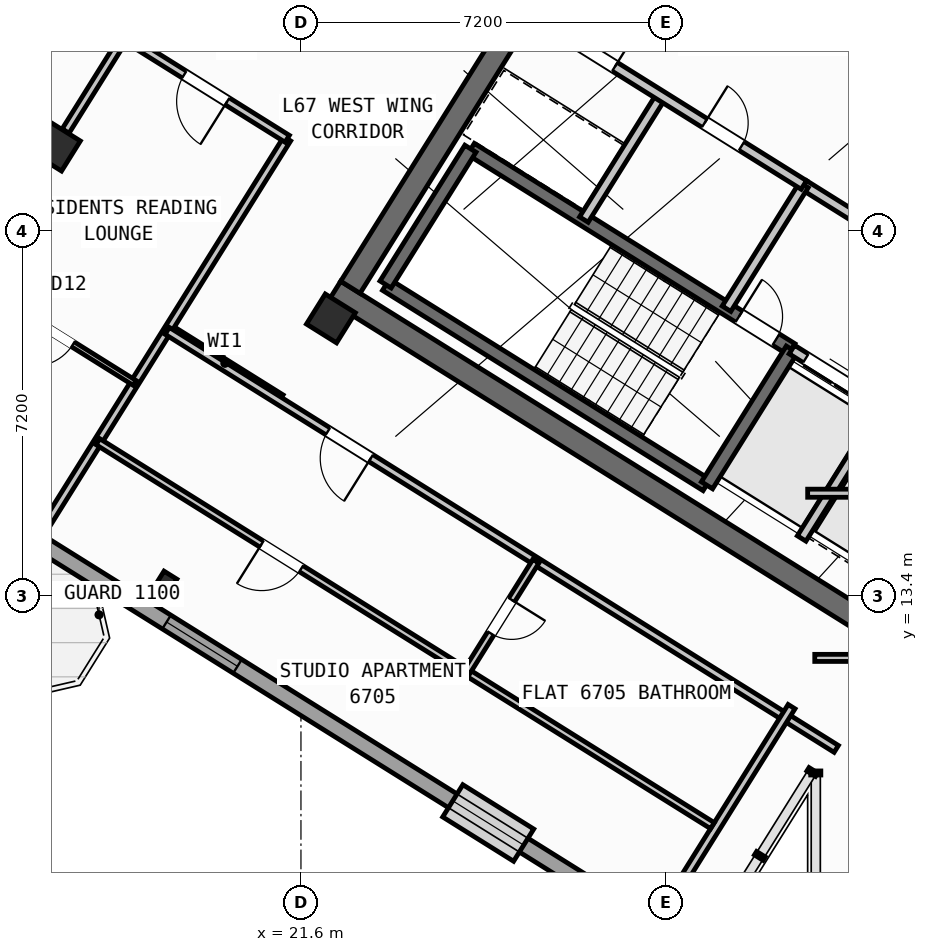
"""IFC4 building model, lengths in metres.
Left out: names, types, materials, properties, quantities, classifications, styles, units other than length and angle.
Written with IfcOpenShell. Run it as: python <this file> out.ifc"""

import sys

from ifc_helpers import new_model, si_unit, direction, frame, frame_2d, origin, origin_2d, place, context, subcontext, project, spatial, rectangle, hollow_rectangle, i_section, extrude, source, transform, mapped, element, fill, save


model = new_model("IFC4")
c1 = context("Model", 3, precision=1e-05, world=origin(), true_north=direction((0.0, 1.0)))
c2 = subcontext(c1, "Body", "Model", "MODEL_VIEW")
j1 = project(units=[si_unit("LENGTHUNIT", "METRE"), si_unit("PLANEANGLEUNIT", "RADIAN")], contexts=[c1])
p1 = place(None, origin())
s1 = spatial("IfcSite", under=j1, at=p1, CompositionType="ELEMENT")
p2 = place(p1, origin())
s2 = spatial("IfcBuilding", under=s1, at=p2, CompositionType="ELEMENT")
p3 = place(p2, frame((0.0, 0.0, 266.4)))
s3 = spatial("IfcBuildingStorey", under=s2, at=p3, CompositionType="ELEMENT", Elevation=266.4)
p4 = place(p3, frame((40.531, 24.036, 0.0), z_axis=(0.0, 0.0, 1.0), x_axis=(-0.848048787466, 0.529918157905, 0.0)))
e1 = element("IfcWall", 1, at=p4, inside=s3, PredefinedType="SHEAR", context=c2, shape_type="SweptSolid", body=[
    extrude(rectangle(XDim=13.04, YDim=0.45, at=frame_2d((6.52, 0.0))), origin(), (0.0, 0.0, 1.0), 3.35),
])
p5 = place(p3, frame((33.324, 12.503, 0.0), z_axis=(0.0, 0.0, 1.0), x_axis=(-0.848043529849, 0.529926571782, 0.0)))
e2 = element("IfcWall", 2, at=p5, inside=s3, PredefinedType="SHEAR", context=c2, shape_type="SweptSolid", body=[
    extrude(rectangle(XDim=13.04, YDim=0.45, at=frame_2d((6.52, 0.0))), origin(), (0.0, 0.0, 1.0), 3.35),
])
p6 = place(p3, frame((26.007, 24.976, 0.0), z_axis=(0.0, 0.0, 1.0), x_axis=(-0.529931155655, -0.848040665456, 0.0)))
e3 = element("IfcWall", 3, at=p6, inside=s3, PredefinedType="SHEAR", context=c2, shape_type="SweptSolid", body=[
    extrude(rectangle(XDim=6.475, YDim=0.45, at=frame_2d((3.238, 0.0))), origin(), (0.0, 0.0, 1.0), 3.35),
])
m1 = source(origin(), c2, "Body", "SweptSolid", [
    extrude(hollow_rectangle(XDim=0.7, YDim=0.7, WallThickness=0.028, at=origin_2d()), origin(), (0.0, 0.0, 1.0), 3.6),
])
p7 = place(p3, frame((22.191, 18.87, 0.0), z_axis=(0.0, 0.0, 1.0), x_axis=(-0.848048096156, 0.529919264233, 0.0)))
e4 = element("IfcColumn", 4, at=p7, inside=s3, PredefinedType="COLUMN", context=c2, shape_type="MappedRepresentation", body=[
    mapped(m1, transform((0.0, 0.0, 0.0), scale=1.0)),
])
m2 = source(origin(), c2, "Body", "SweptSolid", [
    extrude(i_section(OverallWidth=0.3, OverallDepth=0.45, WebThickness=0.014, FlangeThickness=0.026, at=origin_2d()), origin(), (0.0, 0.0, 1.0), 3.6),
])
p8 = place(p3, frame((18.906, 13.612, 0.0), z_axis=(0.0, 0.0, 1.0), x_axis=(-0.848048096156, 0.529919264233, 0.0)))
e5 = element("IfcColumn", 5, at=p8, inside=s3, PredefinedType="COLUMN", context=c2, shape_type="MappedRepresentation", body=[
    mapped(m2, transform((0.0, 0.0, 0.0), scale=1.0)),
])
p9 = place(p3, frame((16.764, 22.261, 0.0), z_axis=(0.0, 0.0, 1.0), x_axis=(-0.848048096156, 0.529919264233, 0.0)))
e6 = element("IfcColumn", 6, at=p9, inside=s3, PredefinedType="COLUMN", context=c2, shape_type="MappedRepresentation", body=[
    mapped(m1, transform((0.0, 0.0, 0.0), scale=1.0)),
])
p10 = place(p3, frame((29.268, 6.429, 0.0), z_axis=(0.0, 0.0, 1.0), x_axis=(-0.848049971435, 0.529916263149, 0.0)))
e7 = element("IfcWall", 7, at=p10, inside=s3, PredefinedType="STANDARD", context=c2, shape_type="SweptSolid", body=[
    extrude(rectangle(XDim=31.588, YDim=0.32, at=frame_2d((15.794, 0.0))), origin(), (0.0, 0.0, 1.0), 3.35),
])
p11 = place(p10, frame((16.362, 0.0, 0.0)))
e8 = element("IfcOpeningElement", 8, at=p11, cuts=e7, PredefinedType="OPENING", context=c2, shape_type="SweptSolid", body=[
    extrude(rectangle(XDim=1.2, YDim=2.15, at=frame_2d((0.6, 1.075))), frame((0.0, 0.17, 0.0), z_axis=(0.0, -1.0, 0.0), x_axis=(1.0, 0.0, 0.0)), (0.0, 0.0, 1.0), 0.34),
])
p12 = place(p10, frame((3.859, 0.0, 0.9)))
e9 = element("IfcOpeningElement", 9, at=p12, cuts=e7, PredefinedType="OPENING", context=c2, shape_type="SweptSolid", body=[
    extrude(rectangle(XDim=1.65, YDim=1.45, at=frame_2d((0.825, 0.725))), frame((0.0, 0.17, 0.0), z_axis=(0.0, -1.0, 0.0), x_axis=(1.0, 0.0, 0.0)), (0.0, 0.0, 1.0), 0.34),
])
p13 = place(p10, frame((10.519, 0.0, 0.9)))
e10 = element("IfcOpeningElement", 10, at=p13, cuts=e7, PredefinedType="OPENING", context=c2, shape_type="SweptSolid", body=[
    extrude(rectangle(XDim=1.65, YDim=1.45, at=frame_2d((0.825, 0.725))), frame((0.0, 0.17, 0.0), z_axis=(0.0, -1.0, 0.0), x_axis=(1.0, 0.0, 0.0)), (0.0, 0.0, 1.0), 0.34),
])
p14 = place(p10, frame((21.219, 0.0, 0.95)))
e11 = element("IfcOpeningElement", 11, at=p14, cuts=e7, PredefinedType="OPENING", context=c2, shape_type="SweptSolid", body=[
    extrude(rectangle(XDim=1.95, YDim=1.35, at=frame_2d((0.975, 0.675))), frame((0.0, 0.17, 0.0), z_axis=(0.0, -1.0, 0.0), x_axis=(1.0, 0.0, 0.0)), (0.0, 0.0, 1.0), 0.34),
])
p15 = place(p10, frame((26.406, 0.0, 1.0)))
e12 = element("IfcOpeningElement", 12, at=p15, cuts=e7, PredefinedType="OPENING", context=c2, shape_type="SweptSolid", body=[
    extrude(rectangle(XDim=0.9, YDim=1.25, at=frame_2d((0.45, 0.625))), frame((0.0, 0.17, 0.0), z_axis=(0.0, -1.0, 0.0), x_axis=(1.0, 0.0, 0.0)), (0.0, 0.0, 1.0), 0.34),
])
p16 = place(p10, frame((29.143, 0.0, 0.9)))
e13 = element("IfcOpeningElement", 13, at=p16, cuts=e7, PredefinedType="OPENING", context=c2, shape_type="SweptSolid", body=[
    extrude(rectangle(XDim=1.65, YDim=1.45, at=frame_2d((0.825, 0.725))), frame((0.0, 0.17, 0.0), z_axis=(0.0, -1.0, 0.0), x_axis=(1.0, 0.0, 0.0)), (0.0, 0.0, 1.0), 0.34),
])
p17 = place(p3, frame((29.605, 15.581, 0.0), z_axis=(0.0, 0.0, 1.0), x_axis=(-0.848036911448, 0.529937163087, 0.0)))
e14 = element("IfcWall", 14, at=p17, inside=s3, PredefinedType="SHEAR", context=c2, shape_type="SweptSolid", body=[
    extrude(rectangle(XDim=7.46, YDim=0.26, at=frame_2d((3.73, 0.0))), origin(), (0.0, 0.0, 1.0), 3.35),
])
p18 = place(p3, frame((31.28, 18.261, 0.0), z_axis=(0.0, 0.0, 1.0), x_axis=(-0.848051618787, 0.529913626805, 0.0)))
e15 = element("IfcWall", 15, at=p18, inside=s3, PredefinedType="SHEAR", context=c2, shape_type="SweptSolid", body=[
    extrude(rectangle(XDim=7.46, YDim=0.26, at=frame_2d((3.73, 0.0))), origin(), (0.0, 0.0, 1.0), 3.35),
])
p19 = place(p18, frame((0.36, 0.0, 0.0)))
e16 = element("IfcOpeningElement", 16, at=p19, cuts=e15, PredefinedType="OPENING", context=c2, shape_type="SweptSolid", body=[
    extrude(rectangle(XDim=0.86, YDim=2.05, at=frame_2d((0.43, 1.025))), frame((0.0, 0.14, 0.0), z_axis=(0.0, -1.0, 0.0), x_axis=(1.0, 0.0, 0.0)), (0.0, 0.0, 1.0), 0.28),
])
p20 = place(p3, frame((31.288, 18.256, 0.0), z_axis=(0.0, 0.0, 1.0), x_axis=(-0.529943379326, -0.848033026897, 0.0)))
e17 = element("IfcWall", 17, at=p20, inside=s3, PredefinedType="SHEAR", context=c2, shape_type="SweptSolid", body=[
    extrude(rectangle(XDim=3.16, YDim=0.26, at=frame_2d((1.58, 0.0))), origin(), (0.0, 0.0, 1.0), 3.35),
])
p21 = place(p3, frame((24.945, 22.22, 0.0), z_axis=(0.0, 0.0, 1.0), x_axis=(-0.529908658664, -0.84805472316, 0.0)))
e18 = element("IfcWall", 18, at=p21, inside=s3, PredefinedType="SHEAR", context=c2, shape_type="SweptSolid", body=[
    extrude(rectangle(XDim=3.16, YDim=0.26, at=frame_2d((1.58, 0.0))), origin(), (0.0, 0.0, 1.0), 3.35),
])
p22 = place(p3, frame((38.046, 21.108, 0.0), z_axis=(0.0, 0.0, 1.0), x_axis=(-0.848054434086, 0.529909121291, 0.0)))
e19 = element("IfcWall", 19, at=p22, inside=s3, PredefinedType="SHEAR", context=c2, shape_type="SweptSolid", body=[
    extrude(rectangle(XDim=7.33, YDim=0.26, at=frame_2d((3.665, 0.0))), origin(), (0.0, 0.0, 1.0), 3.35),
])
p23 = place(p22, frame((0.22, 0.0, 0.0)))
e20 = element("IfcOpeningElement", 20, at=p23, cuts=e19, PredefinedType="OPENING", context=c2, shape_type="SweptSolid", body=[
    extrude(rectangle(XDim=1.1, YDim=2.1, at=frame_2d((0.55, 1.05))), frame((0.0, 0.14, 0.0), z_axis=(0.0, -1.0, 0.0), x_axis=(1.0, 0.0, 0.0)), (0.0, 0.0, 1.0), 0.28),
])
p24 = place(p3, frame((34.933, 15.978, 0.0), z_axis=(0.0, 0.0, 1.0), x_axis=(-0.848055739377, 0.529907032327, 0.0)))
e21 = element("IfcWall", 21, at=p24, inside=s3, PredefinedType="STANDARD", context=c2, shape_type="SweptSolid", body=[
    extrude(rectangle(XDim=4.298, YDim=0.2, at=frame_2d((2.149, 0.0))), origin(), (0.0, 0.0, 1.0), 3.34),
])
p25 = place(p24, frame((0.448, 0.0, 0.0)))
e22 = element("IfcOpeningElement", 22, at=p25, cuts=e21, PredefinedType="OPENING", context=c2, shape_type="SweptSolid", body=[
    extrude(rectangle(XDim=1.3, YDim=2.2, at=frame_2d((0.65, 1.1))), frame((0.0, 0.11, 0.0), z_axis=(0.0, -1.0, 0.0), x_axis=(1.0, 0.0, 0.0)), (0.0, 0.0, 1.0), 0.22),
])
p26 = place(p24, frame((2.523, 0.0, 0.0)))
e23 = element("IfcOpeningElement", 23, at=p26, cuts=e21, PredefinedType="OPENING", context=c2, shape_type="SweptSolid", body=[
    extrude(rectangle(XDim=1.45, YDim=2.25, at=frame_2d((0.725, 1.125))), frame((0.0, 0.11, 0.0), z_axis=(0.0, -1.0, 0.0), x_axis=(1.0, 0.0, 0.0)), (0.0, 0.0, 1.0), 0.22),
])
p27 = place(p3, frame((36.459, 18.421, 0.0), z_axis=(0.0, 0.0, 1.0), x_axis=(-0.848059591691, 0.529900867089, 0.0)))
e24 = element("IfcWall", 24, at=p27, inside=s3, PredefinedType="STANDARD", context=c2, shape_type="SweptSolid", body=[
    extrude(rectangle(XDim=5.818, YDim=0.2, at=frame_2d((2.909, 0.0))), origin(), (0.0, 0.0, 1.0), 3.34),
])
p28 = place(p27, frame((2.598, 0.0, 0.0)))
e25 = element("IfcOpeningElement", 25, at=p28, cuts=e24, PredefinedType="OPENING", context=c2, shape_type="SweptSolid", body=[
    extrude(rectangle(XDim=1.15, YDim=2.1, at=frame_2d((0.575, 1.05))), frame((0.0, 0.11, 0.0), z_axis=(0.0, -1.0, 0.0), x_axis=(1.0, 0.0, 0.0)), (0.0, 0.0, 1.0), 0.22),
])
p29 = place(p3, frame((33.029, 17.003, 0.0), z_axis=(0.0, 0.0, 1.0), x_axis=(-0.529916267533, -0.848049968695, 0.0)))
e26 = element("IfcWall", 26, at=p29, inside=s3, PredefinedType="STANDARD", context=c2, shape_type="SweptSolid", body=[
    extrude(rectangle(XDim=2.92, YDim=0.2, at=frame_2d((1.46, 0.0))), origin(), (0.0, 0.0, 1.0), 3.34),
])
for number, where, z_axis, x_axis in (
    (27, (31.525, 21.504, 0.0), (0.0, 0.0, 1.0), (-0.53, -0.848, 0.0)),
    (28, (28.71, 23.263, 0.0), (0.0, 0.0, 1.0), (-0.53, -0.848, 0.0)),
):
    element("IfcWall", number, at=place(p3, frame(where, z_axis=z_axis, x_axis=x_axis)), inside=s3, PredefinedType="STANDARD", context=c2, shape_type="SweptSolid", body=[
        extrude(rectangle(XDim=2.88, YDim=0.2, at=frame_2d((1.44, 0.0))), origin(), (0.0, 0.0, 1.0), 3.34),
    ])
p30 = place(p3, frame((31.525, 21.504, 0.0), z_axis=(0.0, 0.0, 1.0), x_axis=(-0.848042066329, 0.529928913853, 0.0)))
e29 = element("IfcWall", 29, at=p30, inside=s3, PredefinedType="STANDARD", context=c2, shape_type="SweptSolid", body=[
    extrude(rectangle(XDim=6.268, YDim=0.2, at=frame_2d((3.134, 0.0))), origin(), (0.0, 0.0, 1.0), 3.34),
])
p31 = place(p30, frame((4.4, 0.0, 0.0)))
e30 = element("IfcOpeningElement", 30, at=p31, cuts=e29, PredefinedType="OPENING", context=c2, shape_type="SweptSolid", body=[
    extrude(rectangle(XDim=0.86, YDim=2.05, at=frame_2d((0.43, 1.025))), frame((0.0, 0.11, 0.0), z_axis=(0.0, -1.0, 0.0), x_axis=(1.0, 0.0, 0.0)), (0.0, 0.0, 1.0), 0.22),
])
p32 = place(p30, frame((1.45, 0.0, 0.0)))
e31 = element("IfcOpeningElement", 31, at=p32, cuts=e29, PredefinedType="OPENING", context=c2, shape_type="SweptSolid", body=[
    extrude(rectangle(XDim=0.86, YDim=2.05, at=frame_2d((0.43, 1.025))), frame((0.0, 0.11, 0.0), z_axis=(0.0, -1.0, 0.0), x_axis=(1.0, 0.0, 0.0)), (0.0, 0.0, 1.0), 0.22),
])
p33 = place(p3, frame((21.206, 17.292, 0.0), z_axis=(0.0, 0.0, 1.0), x_axis=(-0.848050851465, 0.529914854792, 0.0)))
e32 = element("IfcWall", 32, at=p33, inside=s3, PredefinedType="PARTITIONING", context=c2, shape_type="SweptSolid", body=[
    extrude(rectangle(XDim=2.61, YDim=0.16, at=frame_2d((1.305, 0.0))), origin(), (0.0, 0.0, 1.0), 3.34),
])
p34 = place(p3, frame((21.329, 22.416, 0.0), z_axis=(0.0, 0.0, 1.0), x_axis=(-0.529920220799, -0.848047498427, 0.0)))
e33 = element("IfcWall", 33, at=p34, inside=s3, PredefinedType="PARTITIONING", context=c2, shape_type="SweptSolid", body=[
    extrude(rectangle(XDim=9.2, YDim=0.16, at=frame_2d((4.6, 0.0))), origin(), (0.0, 0.0, 1.0), 3.34),
])
p35 = place(p3, frame((21.329, 22.416, 0.0), z_axis=(0.0, 0.0, 1.0), x_axis=(-0.848052408131, 0.529912363569, 0.0)))
e34 = element("IfcWall", 34, at=p35, inside=s3, PredefinedType="PARTITIONING", context=c2, shape_type="SweptSolid", body=[
    extrude(rectangle(XDim=16.73, YDim=0.16, at=frame_2d((8.365, 0.0))), origin(), (0.0, 0.0, 1.0), 3.34),
])
p36 = place(p35, frame((1.395, 0.0, 0.0)))
e35 = element("IfcOpeningElement", 35, at=p36, cuts=e34, PredefinedType="OPENING", context=c2, shape_type="SweptSolid", body=[
    extrude(rectangle(XDim=1.0, YDim=2.1, at=frame_2d((0.5, 1.05))), frame((0.0, 0.09, 0.0), z_axis=(0.0, -1.0, 0.0), x_axis=(1.0, 0.0, 0.0)), (0.0, 0.0, 1.0), 0.18),
])
p37 = place(p35, frame((7.82, 0.0, 0.0)))
e36 = element("IfcOpeningElement", 36, at=p37, cuts=e34, PredefinedType="OPENING", context=c2, shape_type="SweptSolid", body=[
    extrude(rectangle(XDim=1.0, YDim=2.1, at=frame_2d((0.5, 1.05))), frame((0.0, 0.09, 0.0), z_axis=(0.0, -1.0, 0.0), x_axis=(1.0, 0.0, 0.0)), (0.0, 0.0, 1.0), 0.18),
])
p38 = place(p35, frame((11.14, 0.0, 0.0)))
e37 = element("IfcOpeningElement", 37, at=p38, cuts=e34, PredefinedType="OPENING", context=c2, shape_type="SweptSolid", body=[
    extrude(rectangle(XDim=1.0, YDim=2.1, at=frame_2d((0.5, 1.05))), frame((0.0, 0.09, 0.0), z_axis=(0.0, -1.0, 0.0), x_axis=(1.0, 0.0, 0.0)), (0.0, 0.0, 1.0), 0.18),
])
p39 = place(p3, frame((18.115, 24.424, 0.0), z_axis=(0.0, 0.0, 1.0), x_axis=(-0.529998940003, -0.847998304005, 0.0)))
e38 = element("IfcWall", 38, at=p39, inside=s3, PredefinedType="PARTITIONING", context=c2, shape_type="SweptSolid", body=[
    extrude(rectangle(XDim=2.188, YDim=0.16, at=frame_2d((1.094, 0.0))), origin(), (0.0, 0.0, 1.0), 2.875),
])
p40 = place(p3, frame((18.318, 17.597, 0.0), z_axis=(0.0, 0.0, 1.0), x_axis=(-0.848059820872, 0.529900500304, 0.0)))
e39 = element("IfcWall", 39, at=p40, inside=s3, PredefinedType="PARTITIONING", context=c2, shape_type="SweptSolid", body=[
    extrude(rectangle(XDim=3.79, YDim=0.11, at=frame_2d((1.895, 0.0))), origin(), (0.0, 0.0, 1.0), 3.34),
])
p41 = place(p40, frame((1.435, 0.0, 0.0)))
e40 = element("IfcOpeningElement", 40, at=p41, cuts=e39, PredefinedType="OPENING", context=c2, shape_type="SweptSolid", body=[
    extrude(rectangle(XDim=0.92, YDim=2.08, at=frame_2d((0.46, 1.04))), frame((0.0, 0.065, 0.0), z_axis=(0.0, -1.0, 0.0), x_axis=(1.0, 0.0, 0.0)), (0.0, 0.0, 1.0), 0.13),
])
p42 = place(p3, frame((32.164, 10.374, 0.0), z_axis=(0.0, 0.0, 1.0), x_axis=(-0.848044107957, 0.529925646633, 0.0)))
e41 = element("IfcWall", 41, at=p42, inside=s3, PredefinedType="PARTITIONING", context=c2, shape_type="SweptSolid", body=[
    extrude(rectangle(XDim=15.57, YDim=0.16, at=frame_2d((7.785, 0.0))), origin(), (0.0, 0.0, 1.0), 3.34),
])
p43 = place(p42, frame((10.83, 0.0, 0.0)))
e42 = element("IfcOpeningElement", 42, at=p43, cuts=e41, PredefinedType="OPENING", context=c2, shape_type="SweptSolid", body=[
    extrude(rectangle(XDim=1.0, YDim=2.1, at=frame_2d((0.5, 1.05))), frame((0.0, 0.09, 0.0), z_axis=(0.0, -1.0, 0.0), x_axis=(1.0, 0.0, 0.0)), (0.0, 0.0, 1.0), 0.18),
])
p44 = place(p3, frame((31.282, 11.208, 0.0), z_axis=(0.0, 0.0, 1.0), x_axis=(-0.529938869374, -0.84803584519, 0.0)))
e43 = element("IfcWall", 43, at=p44, inside=s3, PredefinedType="PARTITIONING", context=c2, shape_type="SweptSolid", body=[
    extrude(rectangle(XDim=5.48, YDim=0.16, at=frame_2d((2.74, 0.0))), origin(), (0.0, 0.0, 1.0), 3.34),
])
p45 = place(p3, frame((29.72, 8.859, 0.0), z_axis=(0.0, 0.0, 1.0), x_axis=(-0.848049134363, 0.529917602752, 0.0)))
e44 = element("IfcWall", 44, at=p45, inside=s3, PredefinedType="PLUMBINGWALL", context=c2, shape_type="SweptSolid", body=[
    extrude(rectangle(XDim=14.3, YDim=0.14, at=frame_2d((7.15, 0.0))), origin(), (0.0, 0.0, 1.0), 3.34),
])
p46 = place(p45, frame((9.57, 0.0, 0.0)))
e45 = element("IfcOpeningElement", 45, at=p46, cuts=e44, PredefinedType="OPENING", context=c2, shape_type="SweptSolid", body=[
    extrude(rectangle(XDim=0.92, YDim=2.08, at=frame_2d((0.46, 1.04))), frame((0.0, 0.08, 0.0), z_axis=(0.0, -1.0, 0.0), x_axis=(1.0, 0.0, 0.0)), (0.0, 0.0, 1.0), 0.16),
])
p47 = place(p3, frame((26.237, 14.078, 0.0), z_axis=(0.0, 0.0, 1.0), x_axis=(-0.52995640672, -0.848024885824, 0.0)))
e46 = element("IfcWall", 46, at=p47, inside=s3, PredefinedType="PLUMBINGWALL", context=c2, shape_type="SweptSolid", body=[
    extrude(rectangle(XDim=2.58, YDim=0.14, at=frame_2d((1.29, 0.0))), origin(), (0.0, 0.0, 1.0), 3.34),
])
p48 = place(p47, frame((0.9, 0.0, 0.0)))
e47 = element("IfcOpeningElement", 47, at=p48, cuts=e46, PredefinedType="OPENING", context=c2, shape_type="SweptSolid", body=[
    extrude(rectangle(XDim=0.78, YDim=2.05, at=frame_2d((0.39, 1.025))), frame((0.0, 0.08, 0.0), z_axis=(0.0, -1.0, 0.0), x_axis=(1.0, 0.0, 0.0)), (0.0, 0.0, 1.0), 0.16),
])
p49 = place(p3, frame((31.6, 15.42, 0.0), z_axis=(0.0, 0.0, 1.0), x_axis=(1.0, 0.0, 0.0)))
e48 = element("IfcWall", 48, at=p49, inside=s3, PredefinedType="PARTITIONING", context=c2, shape_type="SweptSolid", body=[
    extrude(rectangle(XDim=2.984, YDim=0.16, at=frame_2d((1.492, 0.0))), origin(), (0.0, 0.0, 1.0), 3.34),
])
p50 = place(p3, frame((31.74, 12.17, 0.0), z_axis=(0.0, 0.0, 1.0), x_axis=(1.0, 0.0, 0.0)))
e49 = element("IfcWall", 49, at=p50, inside=s3, PredefinedType="PLUMBINGWALL", context=c2, shape_type="SweptSolid", body=[
    extrude(rectangle(XDim=0.931, YDim=0.14, at=frame_2d((0.466, 0.0))), origin(), (0.0, 0.0, 1.0), 3.34),
])
m3 = source(origin(), c2, "Body", "SweptSolid", [
    extrude(rectangle(XDim=1.65, YDim=1.45, at=frame_2d((0.825, 0.725))), frame((0.0, 0.03, 0.0), z_axis=(0.0, -1.0, 0.0), x_axis=(1.0, 0.0, 0.0)), (0.0, 0.0, 1.0), 0.06),
])
p51 = place(p12, origin())
e50 = element("IfcWindow", 50, at=p51, inside=s3, PartitioningType="SINGLE_PANEL", PredefinedType="WINDOW", context=c2, shape_type="MappedRepresentation", body=[
    mapped(m3, transform((0.0, 0.0, 0.0), scale=1.0)),
])
fill(e9, e50)
p52 = place(p13, origin())
e51 = element("IfcWindow", 51, at=p52, inside=s3, PartitioningType="SINGLE_PANEL", PredefinedType="WINDOW", context=c2, shape_type="MappedRepresentation", body=[
    mapped(m3, transform((0.0, 0.0, 0.0), scale=1.0)),
])
fill(e10, e51)
m4 = source(origin(), c2, "Body", "SweptSolid", [
    extrude(rectangle(XDim=0.86, YDim=2.05, at=frame_2d((0.43, 1.025))), frame((0.0, 0.025, 0.0), z_axis=(0.0, -1.0, 0.0), x_axis=(1.0, 0.0, 0.0)), (0.0, 0.0, 1.0), 0.05),
])
p53 = place(p19, frame((0.86, 0.0, 0.0), z_axis=(0.0, 0.0, 1.0), x_axis=(-1.0, 0.0, 0.0)))
e52 = element("IfcDoor", 52, at=p53, inside=s3, OperationType="SINGLE_SWING_LEFT", PredefinedType="DOOR", context=c2, shape_type="MappedRepresentation", body=[
    mapped(m4, transform((0.0, 0.0, 0.0), scale=1.0)),
])
fill(e16, e52)
m5 = source(origin(), c2, "Body", "SweptSolid", [
    extrude(rectangle(XDim=1.45, YDim=2.25, at=frame_2d((0.725, 1.125))), frame((0.0, 0.025, 0.0), z_axis=(0.0, -1.0, 0.0), x_axis=(1.0, 0.0, 0.0)), (0.0, 0.0, 1.0), 0.05),
])
p54 = place(p26, origin())
e53 = element("IfcDoor", 53, at=p54, inside=s3, OperationType="DOUBLE_DOOR_SLIDING", PredefinedType="DOOR", context=c2, shape_type="MappedRepresentation", body=[
    mapped(m5, transform((0.0, 0.0, 0.0), scale=1.0)),
])
fill(e23, e53)
p55 = place(p31, frame((0.86, 0.0, 0.0), z_axis=(0.0, 0.0, 1.0), x_axis=(-1.0, 0.0, 0.0)))
e54 = element("IfcDoor", 54, at=p55, inside=s3, OperationType="SINGLE_SWING_RIGHT", PredefinedType="DOOR", context=c2, shape_type="MappedRepresentation", body=[
    mapped(m4, transform((0.0, 0.0, 0.0), scale=1.0)),
])
fill(e30, e54)
p56 = place(p32, frame((0.86, 0.0, 0.0), z_axis=(0.0, 0.0, 1.0), x_axis=(-1.0, 0.0, 0.0)))
e55 = element("IfcDoor", 55, at=p56, inside=s3, OperationType="SINGLE_SWING_LEFT", PredefinedType="DOOR", context=c2, shape_type="MappedRepresentation", body=[
    mapped(m4, transform((0.0, 0.0, 0.0), scale=1.0)),
])
fill(e31, e55)
m6 = source(origin(), c2, "Body", "SweptSolid", [
    extrude(rectangle(XDim=1.0, YDim=2.1, at=frame_2d((0.5, 1.05))), frame((0.0, 0.025, 0.0), z_axis=(0.0, -1.0, 0.0), x_axis=(1.0, 0.0, 0.0)), (0.0, 0.0, 1.0), 0.05),
])
p57 = place(p36, origin())
e56 = element("IfcDoor", 56, at=p57, inside=s3, OperationType="SINGLE_SWING_LEFT", PredefinedType="DOOR", context=c2, shape_type="MappedRepresentation", body=[
    mapped(m6, transform((0.0, 0.0, 0.0), scale=1.0)),
])
fill(e35, e56)
m7 = source(origin(), c2, "Body", "SweptSolid", [
    extrude(rectangle(XDim=0.92, YDim=2.08, at=frame_2d((0.46, 1.04))), frame((0.0, 0.025, 0.0), z_axis=(0.0, -1.0, 0.0), x_axis=(1.0, 0.0, 0.0)), (0.0, 0.0, 1.0), 0.05),
])
p58 = place(p41, origin())
e57 = element("IfcDoor", 57, at=p58, inside=s3, OperationType="SINGLE_SWING_RIGHT", PredefinedType="DOOR", context=c2, shape_type="MappedRepresentation", body=[
    mapped(m7, transform((0.0, 0.0, 0.0), scale=1.0)),
])
fill(e40, e57)
p59 = place(p43, origin())
e58 = element("IfcDoor", 58, at=p59, inside=s3, OperationType="SINGLE_SWING_LEFT", PredefinedType="DOOR", context=c2, shape_type="MappedRepresentation", body=[
    mapped(m6, transform((0.0, 0.0, 0.0), scale=1.0)),
])
fill(e42, e58)
p60 = place(p46, origin())
e59 = element("IfcDoor", 59, at=p60, inside=s3, OperationType="SINGLE_SWING_RIGHT", PredefinedType="DOOR", context=c2, shape_type="MappedRepresentation", body=[
    mapped(m7, transform((0.0, 0.0, 0.0), scale=1.0)),
])
fill(e45, e59)
m8 = source(origin(), c2, "Body", "SweptSolid", [
    extrude(rectangle(XDim=0.78, YDim=2.05, at=frame_2d((0.39, 1.025))), frame((0.0, 0.025, 0.0), z_axis=(0.0, -1.0, 0.0), x_axis=(1.0, 0.0, 0.0)), (0.0, 0.0, 1.0), 0.05),
])
p61 = place(p48, origin())
e60 = element("IfcDoor", 60, at=p61, inside=s3, OperationType="SINGLE_SWING_LEFT", PredefinedType="DOOR", context=c2, shape_type="MappedRepresentation", body=[
    mapped(m8, transform((0.0, 0.0, 0.0), scale=1.0)),
])
fill(e47, e60)
save(model, sys.argv[1])
